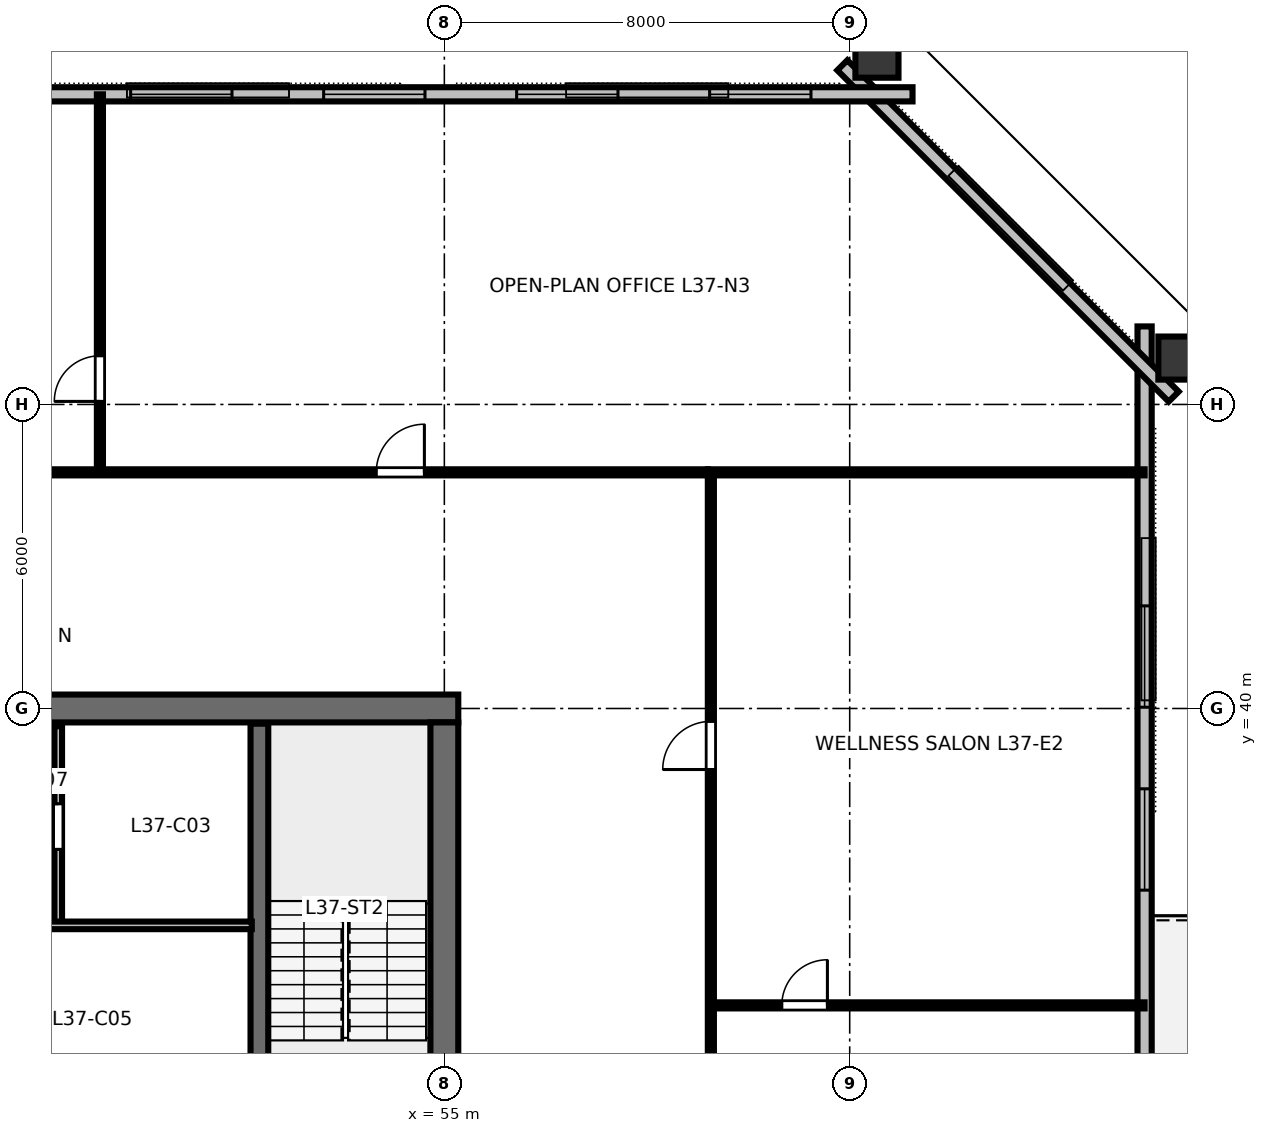
"""IFC4 building model, lengths in metres.
Left out: names, types, materials, properties, quantities, classifications, styles, units other than length and angle.
Written with IfcOpenShell. Run it as: python <this file> out.ifc"""

import sys

from ifc_helpers import new_model, si_unit, direction, frame, frame_2d, origin, origin_2d, place, context, subcontext, project, spatial, rectangle, hollow_rectangle, extrude, element, fill, save


model = new_model("IFC4")
c1 = context("Model", 3, precision=1e-05, world=origin(), true_north=direction((0.0, 1.0)))
c2 = subcontext(c1, "Body", "Model", "MODEL_VIEW")
j1 = project(units=[si_unit("LENGTHUNIT", "METRE"), si_unit("PLANEANGLEUNIT", "RADIAN")], contexts=[c1])
p1 = place(None, origin())
s1 = spatial("IfcSite", under=j1, at=p1, CompositionType="ELEMENT")
p2 = place(p1, origin())
s2 = spatial("IfcBuilding", under=s1, at=p2, CompositionType="ELEMENT")
p3 = place(p2, frame((0.0, 0.0, 142.0)))
s3 = spatial("IfcBuildingStorey", under=s2, at=p3, CompositionType="ELEMENT", Elevation=142.0)
p4 = place(p3, frame((36.725, 40.0, 0.0), z_axis=(0.0, 0.0, 1.0), x_axis=(1.0, 0.0, 0.0)))
e1 = element("IfcWall", 1, at=p4, inside=s3, PredefinedType="SHEAR", context=c2, shape_type="SweptSolid", body=[
    extrude(rectangle(XDim=18.55, YDim=0.55, at=frame_2d((9.275, 0.0))), origin(), (0.0, 0.0, 1.0), 3.36),
])
p5 = place(p4, frame((8.775, 0.0, 0.0)))
e2 = element("IfcOpeningElement", 2, at=p5, cuts=e1, PredefinedType="OPENING", context=c2, shape_type="SweptSolid", body=[
    extrude(rectangle(XDim=1.0, YDim=2.15, at=frame_2d((0.5, 1.075))), frame((0.0, 0.285, 0.0), z_axis=(0.0, -1.0, 0.0), x_axis=(1.0, 0.0, 0.0)), (0.0, 0.0, 1.0), 0.57),
])
p6 = place(p3, frame((55.0, 24.275, 0.0), z_axis=(0.0, 0.0, 1.0), x_axis=(0.0, 1.0, 0.0)))
e3 = element("IfcWall", 3, at=p6, inside=s3, PredefinedType="SHEAR", context=c2, shape_type="SweptSolid", body=[
    extrude(rectangle(XDim=15.45, YDim=0.55, at=frame_2d((7.725, 0.0))), origin(), (0.0, 0.0, 1.0), 3.36),
])
p7 = place(p6, frame((5.25, 0.0, 0.0)))
e4 = element("IfcOpeningElement", 4, at=p7, cuts=e3, PredefinedType="OPENING", context=c2, shape_type="SweptSolid", body=[
    extrude(rectangle(XDim=1.15, YDim=2.15, at=frame_2d((0.575, 1.075))), frame((0.0, 0.285, 0.0), z_axis=(0.0, -1.0, 0.0), x_axis=(1.0, 0.0, 0.0)), (0.0, 0.0, 1.0), 0.57),
])
for number, where, z_axis, x_axis in (
    (5, (69.591, 46.915, 0.0), (0.0, 0.0, 1.0), (0.0, 1.0, 0.0)),
    (6, (63.538, 52.948, 0.0), (0.0, 0.0, 1.0), (1.0, 0.0, 0.0)),
):
    element("IfcColumn", number, at=place(p3, frame(where, z_axis=z_axis, x_axis=x_axis)), inside=s3, PredefinedType="COLUMN", context=c2, shape_type="SweptSolid", body=[
        extrude(hollow_rectangle(XDim=0.85, YDim=1.0, WallThickness=0.05, at=origin_2d()), origin(), (0.0, 0.0, 1.0), 3.358),
    ])
p8 = place(p3, frame((68.82, 16.46, 0.0), z_axis=(0.0, 0.0, 1.0), x_axis=(0.0, 1.0, 0.0)))
e7 = element("IfcWall", 7, at=p8, inside=s3, PredefinedType="STANDARD", context=c2, shape_type="SweptSolid", body=[
    extrude(rectangle(XDim=31.08, YDim=0.28, at=frame_2d((15.54, 0.0))), origin(), (0.0, 0.0, 1.0), 3.36),
])
p9 = place(p8, frame((11.86, 0.0, 0.0)))
e8 = element("IfcOpeningElement", 8, at=p9, cuts=e7, PredefinedType="OPENING", context=c2, shape_type="SweptSolid", body=[
    extrude(rectangle(XDim=1.4, YDim=2.15, at=frame_2d((0.7, 1.075))), frame((0.0, 0.15, 0.0), z_axis=(0.0, -1.0, 0.0), x_axis=(1.0, 0.0, 0.0)), (0.0, 0.0, 1.0), 0.3),
])
p10 = place(p8, frame((5.515, 0.0, 0.8)))
e9 = element("IfcOpeningElement", 9, at=p10, cuts=e7, PredefinedType="OPENING", context=c2, shape_type="SweptSolid", body=[
    extrude(rectangle(XDim=2.0, YDim=1.95, at=frame_2d((1.0, 0.975))), frame((0.0, 0.15, 0.0), z_axis=(0.0, -1.0, 0.0), x_axis=(1.0, 0.0, 0.0)), (0.0, 0.0, 1.0), 0.3),
])
p11 = place(p8, frame((9.125, 0.0, 0.8)))
e10 = element("IfcOpeningElement", 10, at=p11, cuts=e7, PredefinedType="OPENING", context=c2, shape_type="SweptSolid", body=[
    extrude(rectangle(XDim=2.0, YDim=1.95, at=frame_2d((1.0, 0.975))), frame((0.0, 0.15, 0.0), z_axis=(0.0, -1.0, 0.0), x_axis=(1.0, 0.0, 0.0)), (0.0, 0.0, 1.0), 0.3),
])
p12 = place(p8, frame((19.955, 0.0, 0.8)))
e11 = element("IfcOpeningElement", 11, at=p12, cuts=e7, PredefinedType="OPENING", context=c2, shape_type="SweptSolid", body=[
    extrude(rectangle(XDim=2.0, YDim=1.95, at=frame_2d((1.0, 0.975))), frame((0.0, 0.15, 0.0), z_axis=(0.0, -1.0, 0.0), x_axis=(1.0, 0.0, 0.0)), (0.0, 0.0, 1.0), 0.3),
])
p13 = place(p8, frame((23.565, 0.0, 0.8)))
e12 = element("IfcOpeningElement", 12, at=p13, cuts=e7, PredefinedType="OPENING", context=c2, shape_type="SweptSolid", body=[
    extrude(rectangle(XDim=2.0, YDim=1.95, at=frame_2d((1.0, 0.975))), frame((0.0, 0.15, 0.0), z_axis=(0.0, -1.0, 0.0), x_axis=(1.0, 0.0, 0.0)), (0.0, 0.0, 1.0), 0.3),
])
p14 = place(p3, frame((69.394, 46.155, 0.0), z_axis=(0.0, 0.0, 1.0), x_axis=(-0.707106781187, 0.707106781187, 0.0)))
e13 = element("IfcWall", 13, at=p14, inside=s3, PredefinedType="STANDARD", context=c2, shape_type="SweptSolid", body=[
    extrude(rectangle(XDim=9.248, YDim=0.28, at=frame_2d((4.624, 0.0))), origin(), (0.0, 0.0, 1.0), 3.36),
])
p15 = place(p3, frame((64.24, 52.12, 0.0), z_axis=(0.0, 0.0, 1.0), x_axis=(-1.0, 0.0, 0.0)))
e14 = element("IfcWall", 14, at=p15, inside=s3, PredefinedType="STANDARD", context=c2, shape_type="SweptSolid", body=[
    extrude(rectangle(XDim=36.48, YDim=0.28, at=frame_2d((18.24, 0.0))), origin(), (0.0, 0.0, 1.0), 3.36),
])
p16 = place(p15, frame((2.004, 0.0, 0.8)))
e15 = element("IfcOpeningElement", 15, at=p16, cuts=e14, PredefinedType="OPENING", context=c2, shape_type="SweptSolid", body=[
    extrude(rectangle(XDim=2.0, YDim=1.95, at=frame_2d((1.0, 0.975))), frame((0.0, 0.15, 0.0), z_axis=(0.0, -1.0, 0.0), x_axis=(1.0, 0.0, 0.0)), (0.0, 0.0, 1.0), 0.3),
])
p17 = place(p15, frame((5.813, 0.0, 0.8)))
e16 = element("IfcOpeningElement", 16, at=p17, cuts=e14, PredefinedType="OPENING", context=c2, shape_type="SweptSolid", body=[
    extrude(rectangle(XDim=2.0, YDim=1.95, at=frame_2d((1.0, 0.975))), frame((0.0, 0.15, 0.0), z_axis=(0.0, -1.0, 0.0), x_axis=(1.0, 0.0, 0.0)), (0.0, 0.0, 1.0), 0.3),
])
p18 = place(p15, frame((9.622, 0.0, 0.8)))
e17 = element("IfcOpeningElement", 17, at=p18, cuts=e14, PredefinedType="OPENING", context=c2, shape_type="SweptSolid", body=[
    extrude(rectangle(XDim=2.0, YDim=1.95, at=frame_2d((1.0, 0.975))), frame((0.0, 0.15, 0.0), z_axis=(0.0, -1.0, 0.0), x_axis=(1.0, 0.0, 0.0)), (0.0, 0.0, 1.0), 0.3),
])
p19 = place(p15, frame((13.431, 0.0, 0.8)))
e18 = element("IfcOpeningElement", 18, at=p19, cuts=e14, PredefinedType="OPENING", context=c2, shape_type="SweptSolid", body=[
    extrude(rectangle(XDim=2.0, YDim=1.95, at=frame_2d((1.0, 0.975))), frame((0.0, 0.15, 0.0), z_axis=(0.0, -1.0, 0.0), x_axis=(1.0, 0.0, 0.0)), (0.0, 0.0, 1.0), 0.3),
])
p20 = place(p15, frame((21.049, 0.0, 0.8)))
e19 = element("IfcOpeningElement", 19, at=p20, cuts=e14, PredefinedType="OPENING", context=c2, shape_type="SweptSolid", body=[
    extrude(rectangle(XDim=2.0, YDim=1.95, at=frame_2d((1.0, 0.975))), frame((0.0, 0.15, 0.0), z_axis=(0.0, -1.0, 0.0), x_axis=(1.0, 0.0, 0.0)), (0.0, 0.0, 1.0), 0.3),
])
p21 = place(p15, frame((24.858, 0.0, 0.8)))
e20 = element("IfcOpeningElement", 20, at=p21, cuts=e14, PredefinedType="OPENING", context=c2, shape_type="SweptSolid", body=[
    extrude(rectangle(XDim=2.0, YDim=1.95, at=frame_2d((1.0, 0.975))), frame((0.0, 0.15, 0.0), z_axis=(0.0, -1.0, 0.0), x_axis=(1.0, 0.0, 0.0)), (0.0, 0.0, 1.0), 0.3),
])
p22 = place(p15, frame((28.667, 0.0, 0.8)))
e21 = element("IfcOpeningElement", 21, at=p22, cuts=e14, PredefinedType="OPENING", context=c2, shape_type="SweptSolid", body=[
    extrude(rectangle(XDim=2.0, YDim=1.95, at=frame_2d((1.0, 0.975))), frame((0.0, 0.15, 0.0), z_axis=(0.0, -1.0, 0.0), x_axis=(1.0, 0.0, 0.0)), (0.0, 0.0, 1.0), 0.3),
])
p23 = place(p15, frame((32.476, 0.0, 0.8)))
e22 = element("IfcOpeningElement", 22, at=p23, cuts=e14, PredefinedType="OPENING", context=c2, shape_type="SweptSolid", body=[
    extrude(rectangle(XDim=2.0, YDim=1.95, at=frame_2d((1.0, 0.975))), frame((0.0, 0.15, 0.0), z_axis=(0.0, -1.0, 0.0), x_axis=(1.0, 0.0, 0.0)), (0.0, 0.0, 1.0), 0.3),
])
p24 = place(p3, frame((51.35, 32.0, 0.0), z_axis=(0.0, 0.0, 1.0), x_axis=(0.0, 1.0, 0.0)))
e23 = element("IfcWall", 23, at=p24, inside=s3, PredefinedType="SHEAR", context=c2, shape_type="SweptSolid", body=[
    extrude(rectangle(XDim=7.7, YDim=0.35, at=frame_2d((3.85, 0.0))), origin(), (0.0, 0.0, 1.0), 3.6),
])
p25 = place(p3, frame((47.38, 35.72, 0.0), z_axis=(0.0, 0.0, 1.0), x_axis=(0.0, 1.0, 0.0)))
e24 = element("IfcWall", 24, at=p25, inside=s3, PredefinedType="PARTITIONING", context=c2, shape_type="SweptSolid", body=[
    extrude(rectangle(XDim=3.93, YDim=0.15, at=frame_2d((1.965, 0.0))), origin(), (0.0, 0.0, 1.0), 3.36),
])
p26 = place(p25, frame((1.5, 0.0, 0.0)))
e25 = element("IfcOpeningElement", 25, at=p26, cuts=e24, PredefinedType="OPENING", context=c2, shape_type="SweptSolid", body=[
    extrude(rectangle(XDim=0.9, YDim=2.15, at=frame_2d((0.45, 1.075))), frame((0.0, 0.085, 0.0), z_axis=(0.0, -1.0, 0.0), x_axis=(1.0, 0.0, 0.0)), (0.0, 0.0, 1.0), 0.17),
])
p27 = place(p3, frame((40.8, 35.72, 0.0), z_axis=(0.0, 0.0, 1.0), x_axis=(1.0, 0.0, 0.0)))
e26 = element("IfcWall", 26, at=p27, inside=s3, PredefinedType="PARTITIONING", context=c2, shape_type="SweptSolid", body=[
    extrude(rectangle(XDim=10.4, YDim=0.15, at=frame_2d((5.2, 0.0))), origin(), (0.0, 0.0, 1.0), 3.36),
])
p28 = place(p27, frame((4.9, 0.0, 0.0)))
e27 = element("IfcOpeningElement", 27, at=p28, cuts=e26, PredefinedType="OPENING", context=c2, shape_type="SweptSolid", body=[
    extrude(rectangle(XDim=0.9, YDim=2.15, at=frame_2d((0.45, 1.075))), frame((0.0, 0.085, 0.0), z_axis=(0.0, -1.0, 0.0), x_axis=(1.0, 0.0, 0.0)), (0.0, 0.0, 1.0), 0.17),
])
p29 = place(p3, frame((48.202, 44.66, 0.0), z_axis=(0.0, 0.0, 1.0), x_axis=(0.0, 1.0, 0.0)))
e28 = element("IfcWall", 28, at=p29, inside=s3, PredefinedType="PARTITIONING", context=c2, shape_type="SweptSolid", body=[
    extrude(rectangle(XDim=7.46, YDim=0.12, at=frame_2d((3.73, 0.0))), origin(), (0.0, 0.0, 1.0), 2.64),
])
p30 = place(p29, frame((1.4, 0.0, 0.0)))
e29 = element("IfcOpeningElement", 29, at=p30, cuts=e28, PredefinedType="OPENING", context=c2, shape_type="SweptSolid", body=[
    extrude(rectangle(XDim=0.9, YDim=2.15, at=frame_2d((0.45, 1.075))), frame((0.0, 0.07, 0.0), z_axis=(0.0, -1.0, 0.0), x_axis=(1.0, 0.0, 0.0)), (0.0, 0.0, 1.0), 0.14),
])
p31 = place(p3, frame((31.8, 44.66, 0.0), z_axis=(0.0, 0.0, 1.0), x_axis=(1.0, 0.0, 0.0)))
e30 = element("IfcWall", 30, at=p31, inside=s3, PredefinedType="PARTITIONING", context=c2, shape_type="SweptSolid", body=[
    extrude(rectangle(XDim=28.4, YDim=0.12, at=frame_2d((14.2, 0.0))), origin(), (0.0, 0.0, 1.0), 2.64),
])
p32 = place(p31, frame((3.705, 0.0, 0.0)))
e31 = element("IfcOpeningElement", 31, at=p32, cuts=e30, PredefinedType="OPENING", context=c2, shape_type="SweptSolid", body=[
    extrude(rectangle(XDim=0.95, YDim=2.15, at=frame_2d((0.475, 1.075))), frame((0.0, 0.07, 0.0), z_axis=(0.0, -1.0, 0.0), x_axis=(1.0, 0.0, 0.0)), (0.0, 0.0, 1.0), 0.14),
])
p33 = place(p31, frame((11.836, 0.0, 0.0)))
e32 = element("IfcOpeningElement", 32, at=p33, cuts=e30, PredefinedType="OPENING", context=c2, shape_type="SweptSolid", body=[
    extrude(rectangle(XDim=0.95, YDim=2.15, at=frame_2d((0.475, 1.075))), frame((0.0, 0.07, 0.0), z_axis=(0.0, -1.0, 0.0), x_axis=(1.0, 0.0, 0.0)), (0.0, 0.0, 1.0), 0.14),
])
p34 = place(p31, frame((21.856, 0.0, 0.0)))
e33 = element("IfcOpeningElement", 33, at=p34, cuts=e30, PredefinedType="OPENING", context=c2, shape_type="SweptSolid", body=[
    extrude(rectangle(XDim=0.95, YDim=2.15, at=frame_2d((0.475, 1.075))), frame((0.0, 0.07, 0.0), z_axis=(0.0, -1.0, 0.0), x_axis=(1.0, 0.0, 0.0)), (0.0, 0.0, 1.0), 0.14),
])
p35 = place(p3, frame((60.26, 34.141, 0.0), z_axis=(0.0, 0.0, 1.0), x_axis=(1.0, 0.0, 0.0)))
e34 = element("IfcWall", 34, at=p35, inside=s3, PredefinedType="PARTITIONING", context=c2, shape_type="SweptSolid", body=[
    extrude(rectangle(XDim=8.56, YDim=0.12, at=frame_2d((4.28, 0.0))), origin(), (0.0, 0.0, 1.0), 2.64),
])
p36 = place(p35, frame((1.4, 0.0, 0.0)))
e35 = element("IfcOpeningElement", 35, at=p36, cuts=e34, PredefinedType="OPENING", context=c2, shape_type="SweptSolid", body=[
    extrude(rectangle(XDim=0.9, YDim=2.15, at=frame_2d((0.45, 1.075))), frame((0.0, 0.07, 0.0), z_axis=(0.0, -1.0, 0.0), x_axis=(1.0, 0.0, 0.0)), (0.0, 0.0, 1.0), 0.14),
])
p37 = place(p3, frame((60.26, 33.02, 0.0), z_axis=(0.0, 0.0, 1.0), x_axis=(0.0, 1.0, 0.0)))
e36 = element("IfcWall", 36, at=p37, inside=s3, PredefinedType="PARTITIONING", context=c2, shape_type="SweptSolid", body=[
    extrude(rectangle(XDim=11.58, YDim=0.12, at=frame_2d((5.79, 0.0))), origin(), (0.0, 0.0, 1.0), 2.64),
])
p38 = place(p37, frame((5.775, 0.0, 0.0)))
e37 = element("IfcOpeningElement", 37, at=p38, cuts=e36, PredefinedType="OPENING", context=c2, shape_type="SweptSolid", body=[
    extrude(rectangle(XDim=0.95, YDim=2.15, at=frame_2d((0.475, 1.075))), frame((0.0, 0.07, 0.0), z_axis=(0.0, -1.0, 0.0), x_axis=(1.0, 0.0, 0.0)), (0.0, 0.0, 1.0), 0.14),
])
p39 = place(p3, frame((60.2, 44.66, 0.0), z_axis=(0.0, 0.0, 1.0), x_axis=(1.0, 0.0, 0.0)))
e38 = element("IfcWall", 38, at=p39, inside=s3, PredefinedType="PARTITIONING", context=c2, shape_type="SweptSolid", body=[
    extrude(rectangle(XDim=8.62, YDim=0.12, at=frame_2d((4.31, 0.0))), origin(), (0.0, 0.0, 1.0), 2.64),
])
p40 = place(p12, origin())
e39 = element("IfcWindow", 39, at=p40, inside=s3, PartitioningType="SINGLE_PANEL", PredefinedType="WINDOW", context=c2, shape_type="SweptSolid", body=[
    extrude(rectangle(XDim=2.0, YDim=1.95, at=frame_2d((1.0, 0.975))), frame((0.0, 0.03, 0.0), z_axis=(0.0, -1.0, 0.0), x_axis=(1.0, 0.0, 0.0)), (0.0, 0.0, 1.0), 0.06),
])
fill(e11, e39)
p41 = place(p13, origin())
e40 = element("IfcWindow", 40, at=p41, inside=s3, PartitioningType="SINGLE_PANEL", PredefinedType="WINDOW", context=c2, shape_type="SweptSolid", body=[
    extrude(rectangle(XDim=2.0, YDim=1.95, at=frame_2d((1.0, 0.975))), frame((0.0, 0.03, 0.0), z_axis=(0.0, -1.0, 0.0), x_axis=(1.0, 0.0, 0.0)), (0.0, 0.0, 1.0), 0.06),
])
fill(e12, e40)
p42 = place(p16, origin())
e41 = element("IfcWindow", 41, at=p42, inside=s3, PartitioningType="SINGLE_PANEL", PredefinedType="WINDOW", context=c2, shape_type="SweptSolid", body=[
    extrude(rectangle(XDim=2.0, YDim=1.95, at=frame_2d((1.0, 0.975))), frame((0.0, 0.03, 0.0), z_axis=(0.0, -1.0, 0.0), x_axis=(1.0, 0.0, 0.0)), (0.0, 0.0, 1.0), 0.06),
])
fill(e15, e41)
p43 = place(p17, origin())
e42 = element("IfcWindow", 42, at=p43, inside=s3, PartitioningType="SINGLE_PANEL", PredefinedType="WINDOW", context=c2, shape_type="SweptSolid", body=[
    extrude(rectangle(XDim=2.0, YDim=1.95, at=frame_2d((1.0, 0.975))), frame((0.0, 0.03, 0.0), z_axis=(0.0, -1.0, 0.0), x_axis=(1.0, 0.0, 0.0)), (0.0, 0.0, 1.0), 0.06),
])
fill(e16, e42)
p44 = place(p18, origin())
e43 = element("IfcWindow", 43, at=p44, inside=s3, PartitioningType="SINGLE_PANEL", PredefinedType="WINDOW", context=c2, shape_type="SweptSolid", body=[
    extrude(rectangle(XDim=2.0, YDim=1.95, at=frame_2d((1.0, 0.975))), frame((0.0, 0.03, 0.0), z_axis=(0.0, -1.0, 0.0), x_axis=(1.0, 0.0, 0.0)), (0.0, 0.0, 1.0), 0.06),
])
fill(e17, e43)
p45 = place(p19, origin())
e44 = element("IfcWindow", 44, at=p45, inside=s3, PartitioningType="SINGLE_PANEL", PredefinedType="WINDOW", context=c2, shape_type="SweptSolid", body=[
    extrude(rectangle(XDim=2.0, YDim=1.95, at=frame_2d((1.0, 0.975))), frame((0.0, 0.03, 0.0), z_axis=(0.0, -1.0, 0.0), x_axis=(1.0, 0.0, 0.0)), (0.0, 0.0, 1.0), 0.06),
])
fill(e18, e44)
p46 = place(p26, origin())
e45 = element("IfcDoor", 45, at=p46, inside=s3, OperationType="SINGLE_SWING_RIGHT", PredefinedType="DOOR", context=c2, shape_type="SweptSolid", body=[
    extrude(rectangle(XDim=0.9, YDim=2.15, at=frame_2d((0.45, 1.075))), frame((0.0, 0.025, 0.0), z_axis=(0.0, -1.0, 0.0), x_axis=(1.0, 0.0, 0.0)), (0.0, 0.0, 1.0), 0.05),
])
fill(e25, e45)
p47 = place(p30, origin())
e46 = element("IfcDoor", 46, at=p47, inside=s3, OperationType="SINGLE_SWING_LEFT", PredefinedType="DOOR", context=c2, shape_type="SweptSolid", body=[
    extrude(rectangle(XDim=0.9, YDim=2.15, at=frame_2d((0.45, 1.075))), frame((0.0, 0.025, 0.0), z_axis=(0.0, -1.0, 0.0), x_axis=(1.0, 0.0, 0.0)), (0.0, 0.0, 1.0), 0.05),
])
fill(e29, e46)
p48 = place(p34, origin())
e47 = element("IfcDoor", 47, at=p48, inside=s3, OperationType="SINGLE_SWING_RIGHT", PredefinedType="DOOR", context=c2, shape_type="SweptSolid", body=[
    extrude(rectangle(XDim=0.95, YDim=2.15, at=frame_2d((0.475, 1.075))), frame((0.0, 0.025, 0.0), z_axis=(0.0, -1.0, 0.0), x_axis=(1.0, 0.0, 0.0)), (0.0, 0.0, 1.0), 0.05),
])
fill(e33, e47)
p49 = place(p36, origin())
e48 = element("IfcDoor", 48, at=p49, inside=s3, OperationType="SINGLE_SWING_RIGHT", PredefinedType="DOOR", context=c2, shape_type="SweptSolid", body=[
    extrude(rectangle(XDim=0.9, YDim=2.15, at=frame_2d((0.45, 1.075))), frame((0.0, 0.025, 0.0), z_axis=(0.0, -1.0, 0.0), x_axis=(1.0, 0.0, 0.0)), (0.0, 0.0, 1.0), 0.05),
])
fill(e35, e48)
p50 = place(p38, origin())
e49 = element("IfcDoor", 49, at=p50, inside=s3, OperationType="SINGLE_SWING_LEFT", PredefinedType="DOOR", context=c2, shape_type="SweptSolid", body=[
    extrude(rectangle(XDim=0.95, YDim=2.15, at=frame_2d((0.475, 1.075))), frame((0.0, 0.025, 0.0), z_axis=(0.0, -1.0, 0.0), x_axis=(1.0, 0.0, 0.0)), (0.0, 0.0, 1.0), 0.05),
])
fill(e37, e49)
save(model, sys.argv[1])
